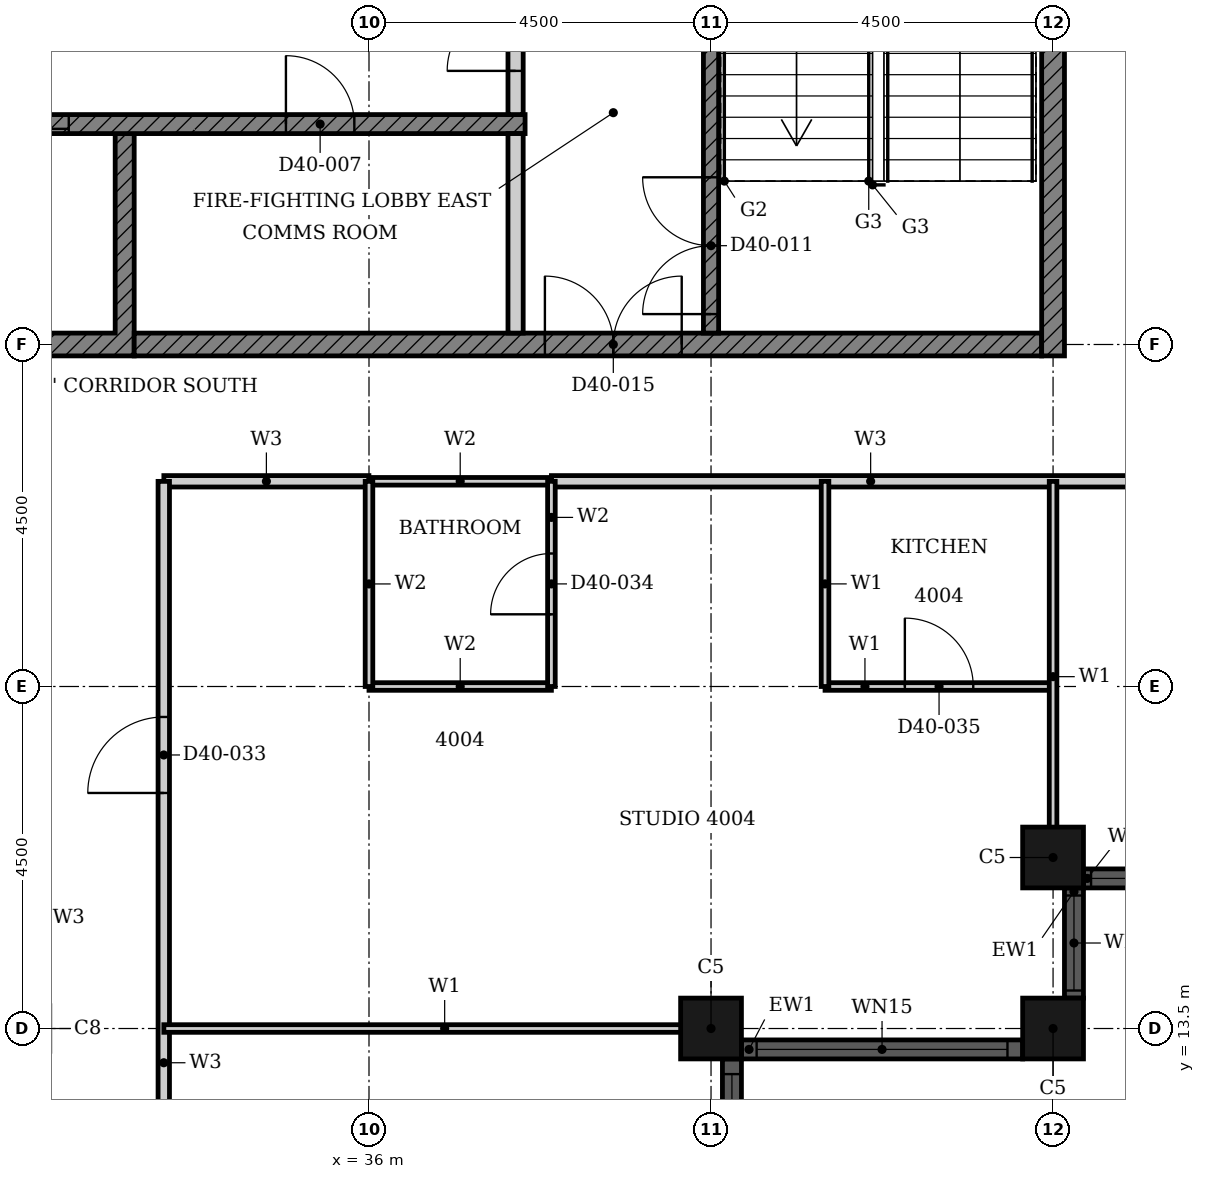
"""IFC4 building model, lengths in metres.
Left out: names, types, materials, properties, quantities, classifications, styles, units other than length and angle.
Written with IfcOpenShell. Run it as: python <this file> out.ifc"""

import sys

from ifc_helpers import new_model, si_unit, direction, frame, frame_2d, origin, origin_2d, place, context, subcontext, project, spatial, polyline, rectangle, hollow_rectangle, outline, extrude, element, fill, save


model = new_model("IFC4")
c1 = context("Model", 3, precision=1e-05, world=origin(), true_north=direction((0.0, 1.0)))
c2 = subcontext(c1, "Body", "Model", "MODEL_VIEW")
j1 = project(units=[si_unit("LENGTHUNIT", "METRE"), si_unit("PLANEANGLEUNIT", "RADIAN")], contexts=[c1])
p1 = place(None, origin())
s1 = spatial("IfcSite", under=j1, at=p1, CompositionType="ELEMENT")
p2 = place(p1, origin())
s2 = spatial("IfcBuilding", under=s1, at=p2, CompositionType="ELEMENT")
p3 = place(p2, frame((0.0, 0.0, 161.7)))
s3 = spatial("IfcBuildingStorey", under=s2, at=p3, CompositionType="ELEMENT", Elevation=161.7)
for number, where, z_axis, x_axis in (
    (1, (40.5, 13.5, 0.0), (0.0, 0.0, 1.0), (1.0, 0.0, 0.0)),
    (2, (45.0, 13.5, 0.0), (0.0, 0.0, 1.0), (1.0, 0.0, 0.0)),
    (3, (45.0, 15.75, 0.0), (0.0, 0.0, 1.0), (1.0, 0.0, 0.0)),
):
    element("IfcColumn", number, at=place(p3, frame(where, z_axis=z_axis, x_axis=x_axis)), inside=s3, PredefinedType="COLUMN", context=c2, shape_type="SweptSolid", body=[
        extrude(hollow_rectangle(XDim=0.8, YDim=0.8, WallThickness=0.025, at=origin_2d()), origin(), (0.0, 0.0, 1.0), 3.7),
    ])
p4 = place(p3, frame((40.775, 4.9, 0.0), z_axis=(0.0, 0.0, 1.0), x_axis=(0.0, 1.0, 0.0)))
e4 = element("IfcWall", 4, at=p4, inside=s3, PredefinedType="SOLIDWALL", context=c2, shape_type="SweptSolid", body=[
    extrude(rectangle(XDim=8.2, YDim=0.25, at=frame_2d((4.1, 0.0))), origin(), (0.0, 0.0, 1.0), 3.7),
])
p5 = place(p4, frame((0.2, 0.0, 0.45)))
e5 = element("IfcOpeningElement", 5, at=p5, cuts=e4, PredefinedType="OPENING", context=c2, shape_type="SweptSolid", body=[
    extrude(rectangle(XDim=3.3, YDim=2.3, at=frame_2d((1.65, 1.15))), frame((0.0, 0.135, 0.0), z_axis=(0.0, -1.0, 0.0), x_axis=(1.0, 0.0, 0.0)), (0.0, 0.0, 1.0), 0.27),
])
p6 = place(p4, frame((4.7, 0.0, 0.45)))
e6 = element("IfcOpeningElement", 6, at=p6, cuts=e4, PredefinedType="OPENING", context=c2, shape_type="SweptSolid", body=[
    extrude(rectangle(XDim=3.3, YDim=2.3, at=frame_2d((1.65, 1.15))), frame((0.0, 0.135, 0.0), z_axis=(0.0, -1.0, 0.0), x_axis=(1.0, 0.0, 0.0)), (0.0, 0.0, 1.0), 0.27),
])
p7 = place(p3, frame((40.9, 13.225, 0.0), z_axis=(0.0, 0.0, 1.0), x_axis=(1.0, 0.0, 0.0)))
e7 = element("IfcWall", 7, at=p7, inside=s3, PredefinedType="SOLIDWALL", context=c2, shape_type="SweptSolid", body=[
    extrude(rectangle(XDim=3.7, YDim=0.25, at=frame_2d((1.85, 0.0))), origin(), (0.0, 0.0, 1.0), 3.7),
])
p8 = place(p7, frame((0.2, 0.0, 0.45)))
e8 = element("IfcOpeningElement", 8, at=p8, cuts=e7, PredefinedType="OPENING", context=c2, shape_type="SweptSolid", body=[
    extrude(rectangle(XDim=3.3, YDim=2.3, at=frame_2d((1.65, 1.15))), frame((0.0, 0.135, 0.0), z_axis=(0.0, -1.0, 0.0), x_axis=(1.0, 0.0, 0.0)), (0.0, 0.0, 1.0), 0.27),
])
p9 = place(p3, frame((45.275, 13.9, 0.0), z_axis=(0.0, 0.0, 1.0), x_axis=(0.0, 1.0, 0.0)))
e9 = element("IfcWall", 9, at=p9, inside=s3, PredefinedType="SOLIDWALL", context=c2, shape_type="SweptSolid", body=[
    extrude(rectangle(XDim=1.45, YDim=0.25, at=frame_2d((0.725, 0.0))), origin(), (0.0, 0.0, 1.0), 3.7),
])
p10 = place(p9, frame((0.1, 0.0, 0.9)))
e10 = element("IfcOpeningElement", 10, at=p10, cuts=e9, PredefinedType="OPENING", context=c2, shape_type="SweptSolid", body=[
    extrude(rectangle(XDim=1.25, YDim=1.85, at=frame_2d((0.625, 0.925))), frame((0.0, 0.135, 0.0), z_axis=(0.0, -1.0, 0.0), x_axis=(1.0, 0.0, 0.0)), (0.0, 0.0, 1.0), 0.27),
])
p11 = place(p3, frame((45.4, 15.475, 0.0), z_axis=(0.0, 0.0, 1.0), x_axis=(1.0, 0.0, 0.0)))
e11 = element("IfcWall", 11, at=p11, inside=s3, PredefinedType="SOLIDWALL", context=c2, shape_type="SweptSolid", body=[
    extrude(rectangle(XDim=1.45, YDim=0.25, at=frame_2d((0.725, 0.0))), origin(), (0.0, 0.0, 1.0), 3.7),
])
p12 = place(p11, frame((0.1, 0.0, 0.9)))
e12 = element("IfcOpeningElement", 12, at=p12, cuts=e11, PredefinedType="OPENING", context=c2, shape_type="SweptSolid", body=[
    extrude(rectangle(XDim=1.25, YDim=1.85, at=frame_2d((0.625, 0.925))), frame((0.0, 0.135, 0.0), z_axis=(0.0, -1.0, 0.0), x_axis=(1.0, 0.0, 0.0)), (0.0, 0.0, 1.0), 0.27),
])
p13 = place(p3, origin())
e13 = element("IfcWall", 13, at=p13, inside=s3, PredefinedType="SHEAR", context=c2, shape_type="SweptSolid", body=[
    extrude(outline(polyline([(27.518, 22.35), (32.911, 22.35), (32.911, 25.275), (32.661, 25.275), (32.661, 22.65), (30.339, 22.65), (30.339, 25.275), (30.089, 25.275), (30.089, 22.65), (27.768, 22.65), (27.768, 25.275), (27.518, 25.275), (27.518, 22.35)])), origin(), (0.0, 0.0, 1.0), 3.4),
])
p14 = place(p3, frame((32.911, 22.5, 0.0), z_axis=(0.0, 0.0, 1.0), x_axis=(1.0, 0.0, 0.0)))
e14 = element("IfcWall", 14, at=p14, inside=s3, PredefinedType="SHEAR", context=c2, shape_type="SweptSolid", body=[
    extrude(rectangle(XDim=11.939, YDim=0.3, at=frame_2d((5.97, 0.0))), origin(), (0.0, 0.0, 1.0), 3.4),
])
p15 = place(p14, frame((5.404, 0.0, 0.0)))
e15 = element("IfcOpeningElement", 15, at=p15, cuts=e14, PredefinedType="OPENING", context=c2, shape_type="SweptSolid", body=[
    extrude(rectangle(XDim=1.8, YDim=2.1, at=frame_2d((0.9, 1.05))), frame((0.0, 0.16, 0.0), z_axis=(0.0, -1.0, 0.0), x_axis=(1.0, 0.0, 0.0)), (0.0, 0.0, 1.0), 0.32),
])
p16 = place(p3, frame((45.0, 22.35, 0.0), z_axis=(0.0, 0.0, 1.0), x_axis=(0.0, 1.0, 0.0)))
e16 = element("IfcWall", 16, at=p16, inside=s3, PredefinedType="SHEAR", context=c2, shape_type="SweptSolid", body=[
    extrude(rectangle(XDim=9.3, YDim=0.3, at=frame_2d((4.65, 0.0))), origin(), (0.0, 0.0, 1.0), 3.4),
])
p17 = place(p3, frame((22.375, 25.4, 0.0), z_axis=(0.0, 0.0, 1.0), x_axis=(1.0, 0.0, 0.0)))
e17 = element("IfcWall", 17, at=p17, inside=s3, PredefinedType="SHEAR", context=c2, shape_type="SweptSolid", body=[
    extrude(rectangle(XDim=15.678, YDim=0.25, at=frame_2d((7.839, 0.0))), origin(), (0.0, 0.0, 1.0), 3.4),
])
p18 = place(p17, frame((8.575, 0.0, 0.0)))
e18 = element("IfcOpeningElement", 18, at=p18, cuts=e17, PredefinedType="OPENING", context=c2, shape_type="SweptSolid", body=[
    extrude(rectangle(XDim=1.1, YDim=2.1, at=frame_2d((0.55, 1.05))), frame((0.0, 0.135, 0.0), z_axis=(0.0, -1.0, 0.0), x_axis=(1.0, 0.0, 0.0)), (0.0, 0.0, 1.0), 0.27),
])
p19 = place(p17, frame((0.861, 0.0, 0.0)))
e19 = element("IfcOpeningElement", 19, at=p19, cuts=e17, PredefinedType="OPENING", context=c2, shape_type="SweptSolid", body=[
    extrude(rectangle(XDim=1.1, YDim=2.1, at=frame_2d((0.55, 1.05))), frame((0.0, 0.135, 0.0), z_axis=(0.0, -1.0, 0.0), x_axis=(1.0, 0.0, 0.0)), (0.0, 0.0, 1.0), 0.27),
])
p20 = place(p17, frame((3.532, 0.0, 0.0)))
e20 = element("IfcOpeningElement", 20, at=p20, cuts=e17, PredefinedType="OPENING", context=c2, shape_type="SweptSolid", body=[
    extrude(rectangle(XDim=0.9, YDim=2.1, at=frame_2d((0.45, 1.05))), frame((0.0, 0.135, 0.0), z_axis=(0.0, -1.0, 0.0), x_axis=(1.0, 0.0, 0.0)), (0.0, 0.0, 1.0), 0.27),
])
p21 = place(p17, frame((12.532, 0.0, 0.0)))
e21 = element("IfcOpeningElement", 21, at=p21, cuts=e17, PredefinedType="OPENING", context=c2, shape_type="SweptSolid", body=[
    extrude(rectangle(XDim=0.9, YDim=2.1, at=frame_2d((0.45, 1.05))), frame((0.0, 0.135, 0.0), z_axis=(0.0, -1.0, 0.0), x_axis=(1.0, 0.0, 0.0)), (0.0, 0.0, 1.0), 0.27),
])
p22 = place(p3, frame((37.928, 22.65, 0.0), z_axis=(0.0, 0.0, 1.0), x_axis=(0.0, 1.0, 0.0)))
e22 = element("IfcWall", 22, at=p22, inside=s3, PredefinedType="PARTITIONING", context=c2, shape_type="SweptSolid", body=[
    extrude(rectangle(XDim=2.625, YDim=0.2, at=frame_2d((1.312, 0.0))), origin(), (0.0, 0.0, 1.0), 3.4),
])
p23 = place(p3, frame((40.5, 22.65, 0.0), z_axis=(0.0, 0.0, 1.0), x_axis=(0.0, 1.0, 0.0)))
e23 = element("IfcWall", 23, at=p23, inside=s3, PredefinedType="SHEAR", context=c2, shape_type="SweptSolid", body=[
    extrude(rectangle(XDim=5.825, YDim=0.2, at=frame_2d((2.913, 0.0))), origin(), (0.0, 0.0, 1.0), 3.4),
])
p24 = place(p23, frame((0.25, 0.0, 0.0)))
e24 = element("IfcOpeningElement", 24, at=p24, cuts=e23, PredefinedType="OPENING", context=c2, shape_type="SweptSolid", body=[
    extrude(rectangle(XDim=1.8, YDim=2.1, at=frame_2d((0.9, 1.05))), frame((0.0, 0.11, 0.0), z_axis=(0.0, -1.0, 0.0), x_axis=(1.0, 0.0, 0.0)), (0.0, 0.0, 1.0), 0.22),
])
p25 = place(p3, frame((37.928, 25.525, 0.0), z_axis=(0.0, 0.0, 1.0), x_axis=(0.0, 1.0, 0.0)))
e25 = element("IfcWall", 25, at=p25, inside=s3, PredefinedType="PARTITIONING", context=c2, shape_type="SweptSolid", body=[
    extrude(rectangle(XDim=2.95, YDim=0.2, at=frame_2d((1.475, 0.0))), origin(), (0.0, 0.0, 1.0), 3.4),
])
p26 = place(p25, frame((0.575, 0.0, 0.0)))
e26 = element("IfcOpeningElement", 26, at=p26, cuts=e25, PredefinedType="OPENING", context=c2, shape_type="SweptSolid", body=[
    extrude(rectangle(XDim=1.8, YDim=2.1, at=frame_2d((0.9, 1.05))), frame((0.0, 0.11, 0.0), z_axis=(0.0, -1.0, 0.0), x_axis=(1.0, 0.0, 0.0)), (0.0, 0.0, 1.0), 0.22),
])
p27 = place(p3, frame((33.301, 20.7, 0.0), z_axis=(0.0, 0.0, 1.0), x_axis=(1.0, 0.0, 0.0)))
e27 = element("IfcWall", 27, at=p27, inside=s3, PredefinedType="PARTITIONING", context=c2, shape_type="SweptSolid", body=[
    extrude(rectangle(XDim=2.698, YDim=0.15, at=frame_2d((1.349, 0.0))), origin(), (0.0, 0.0, 1.0), 3.4),
])
p28 = place(p3, frame((38.4, 20.7, 0.0), z_axis=(0.0, 0.0, 1.0), x_axis=(1.0, 0.0, 0.0)))
e28 = element("IfcWall", 28, at=p28, inside=s3, PredefinedType="PARTITIONING", context=c2, shape_type="SweptSolid", body=[
    extrude(rectangle(XDim=8.4, YDim=0.15, at=frame_2d((4.2, 0.0))), origin(), (0.0, 0.0, 1.0), 3.4),
])
p29 = place(p3, frame((33.3, 4.5, 0.0), z_axis=(0.0, 0.0, 1.0), x_axis=(0.0, 1.0, 0.0)))
e29 = element("IfcWall", 29, at=p29, inside=s3, PredefinedType="PARTITIONING", context=c2, shape_type="SweptSolid", body=[
    extrude(rectangle(XDim=16.199, YDim=0.15, at=frame_2d((8.1, 0.0))), origin(), (0.0, 0.0, 1.0), 3.4),
])
p30 = place(p29, frame((12.099, 0.0, 0.0)))
e30 = element("IfcOpeningElement", 30, at=p30, cuts=e29, PredefinedType="OPENING", context=c2, shape_type="SweptSolid", body=[
    extrude(rectangle(XDim=1.0, YDim=2.2, at=frame_2d((0.5, 1.1))), frame((0.0, 0.085, 0.0), z_axis=(0.0, -1.0, 0.0), x_axis=(1.0, 0.0, 0.0)), (0.0, 0.0, 1.0), 0.17),
])
p31 = place(p29, frame((4.0, 0.0, 0.0)))
e31 = element("IfcOpeningElement", 31, at=p31, cuts=e29, PredefinedType="OPENING", context=c2, shape_type="SweptSolid", body=[
    extrude(rectangle(XDim=1.0, YDim=2.1, at=frame_2d((0.5, 1.05))), frame((0.0, 0.085, 0.0), z_axis=(0.0, -1.0, 0.0), x_axis=(1.0, 0.0, 0.0)), (0.0, 0.0, 1.0), 0.17),
])
p32 = place(p3, frame((33.301, 13.5, 0.0), z_axis=(0.0, 0.0, 1.0), x_axis=(1.0, 0.0, 0.0)))
e32 = element("IfcWall", 32, at=p32, inside=s3, PredefinedType="PARTITIONING", context=c2, shape_type="SweptSolid", body=[
    extrude(rectangle(XDim=7.389, YDim=0.1, at=frame_2d((3.694, 0.0))), origin(), (0.0, 0.0, 1.0), 2.48),
])
p33 = place(p3, frame((42.0, 18.0, 0.0), z_axis=(0.0, 0.0, 1.0), x_axis=(1.0, 0.0, 0.0)))
e33 = element("IfcWall", 33, at=p33, inside=s3, PredefinedType="PARTITIONING", context=c2, shape_type="SweptSolid", body=[
    extrude(rectangle(XDim=3.0, YDim=0.1, at=frame_2d((1.5, 0.0))), origin(), (0.0, 0.0, 1.0), 3.4),
])
p34 = place(p33, frame((1.05, 0.0, 0.0)))
e34 = element("IfcOpeningElement", 34, at=p34, cuts=e33, PredefinedType="OPENING", context=c2, shape_type="SweptSolid", body=[
    extrude(rectangle(XDim=0.9, YDim=2.1, at=frame_2d((0.45, 1.05))), frame((0.0, 0.06, 0.0), z_axis=(0.0, -1.0, 0.0), x_axis=(1.0, 0.0, 0.0)), (0.0, 0.0, 1.0), 0.12),
])
p35 = place(p3, frame((42.0, 18.0, 0.0), z_axis=(0.0, 0.0, 1.0), x_axis=(0.0, 1.0, 0.0)))
e35 = element("IfcWall", 35, at=p35, inside=s3, PredefinedType="PARTITIONING", context=c2, shape_type="SweptSolid", body=[
    extrude(rectangle(XDim=2.7, YDim=0.1, at=frame_2d((1.35, 0.0))), origin(), (0.0, 0.0, 1.0), 3.4),
])
p36 = place(p3, frame((45.0, 15.56, 0.0), z_axis=(0.0, 0.0, 1.0), x_axis=(0.0, 1.0, 0.0)))
e36 = element("IfcWall", 36, at=p36, inside=s3, PredefinedType="PARTITIONING", context=c2, shape_type="SweptSolid", body=[
    extrude(rectangle(XDim=5.139, YDim=0.1, at=frame_2d((2.569, 0.0))), origin(), (0.0, 0.0, 1.0), 3.4),
])
for number, where, z_axis, x_axis in (
    (37, (36.0, 18.0, 0.0), (0.0, 0.0, 1.0), (1.0, 0.0, 0.0)),
    (38, (36.0, 20.7, 0.0), (0.0, 0.0, 1.0), (1.0, 0.0, 0.0)),
):
    element("IfcWall", number, at=place(p3, frame(where, z_axis=z_axis, x_axis=x_axis)), inside=s3, PredefinedType="PARTITIONING", context=c2, shape_type="SweptSolid", body=[
        extrude(rectangle(XDim=2.4, YDim=0.1, at=frame_2d((1.2, 0.0))), origin(), (0.0, 0.0, 1.0), 3.4),
    ])
p37 = place(p3, frame((36.0, 18.0, 0.0), z_axis=(0.0, 0.0, 1.0), x_axis=(0.0, 1.0, 0.0)))
e39 = element("IfcWall", 39, at=p37, inside=s3, PredefinedType="PARTITIONING", context=c2, shape_type="SweptSolid", body=[
    extrude(rectangle(XDim=2.699, YDim=0.1, at=frame_2d((1.35, 0.0))), origin(), (0.0, 0.0, 1.0), 3.4),
])
p38 = place(p3, frame((38.4, 18.0, 0.0), z_axis=(0.0, 0.0, 1.0), x_axis=(0.0, 1.0, 0.0)))
e40 = element("IfcWall", 40, at=p38, inside=s3, PredefinedType="PARTITIONING", context=c2, shape_type="SweptSolid", body=[
    extrude(rectangle(XDim=2.7, YDim=0.1, at=frame_2d((1.35, 0.0))), origin(), (0.0, 0.0, 1.0), 3.4),
])
p39 = place(p38, frame((0.95, 0.0, 0.0)))
e41 = element("IfcOpeningElement", 41, at=p39, cuts=e40, PredefinedType="OPENING", context=c2, shape_type="SweptSolid", body=[
    extrude(rectangle(XDim=0.8, YDim=2.1, at=frame_2d((0.4, 1.05))), frame((0.0, 0.06, 0.0), z_axis=(0.0, -1.0, 0.0), x_axis=(1.0, 0.0, 0.0)), (0.0, 0.0, 1.0), 0.12),
])
p40 = place(p6, origin())
e42 = element("IfcWindow", 42, at=p40, inside=s3, PartitioningType="SINGLE_PANEL", PredefinedType="WINDOW", context=c2, shape_type="SweptSolid", body=[
    extrude(rectangle(XDim=3.3, YDim=2.3, at=frame_2d((1.65, 1.15))), frame((0.0, 0.03, 0.0), z_axis=(0.0, -1.0, 0.0), x_axis=(1.0, 0.0, 0.0)), (0.0, 0.0, 1.0), 0.06),
])
fill(e6, e42)
p41 = place(p8, origin())
e43 = element("IfcWindow", 43, at=p41, inside=s3, PartitioningType="SINGLE_PANEL", PredefinedType="WINDOW", context=c2, shape_type="SweptSolid", body=[
    extrude(rectangle(XDim=3.3, YDim=2.3, at=frame_2d((1.65, 1.15))), frame((0.0, 0.03, 0.0), z_axis=(0.0, -1.0, 0.0), x_axis=(1.0, 0.0, 0.0)), (0.0, 0.0, 1.0), 0.06),
])
fill(e8, e43)
p42 = place(p10, origin())
e44 = element("IfcWindow", 44, at=p42, inside=s3, PartitioningType="SINGLE_PANEL", PredefinedType="WINDOW", context=c2, shape_type="SweptSolid", body=[
    extrude(rectangle(XDim=1.25, YDim=1.85, at=frame_2d((0.625, 0.925))), frame((0.0, 0.03, 0.0), z_axis=(0.0, -1.0, 0.0), x_axis=(1.0, 0.0, 0.0)), (0.0, 0.0, 1.0), 0.06),
])
fill(e10, e44)
p43 = place(p12, origin())
e45 = element("IfcWindow", 45, at=p43, inside=s3, PartitioningType="SINGLE_PANEL", PredefinedType="WINDOW", context=c2, shape_type="SweptSolid", body=[
    extrude(rectangle(XDim=1.25, YDim=1.85, at=frame_2d((0.625, 0.925))), frame((0.0, 0.03, 0.0), z_axis=(0.0, -1.0, 0.0), x_axis=(1.0, 0.0, 0.0)), (0.0, 0.0, 1.0), 0.06),
])
fill(e12, e45)
p44 = place(p18, origin())
e46 = element("IfcDoor", 46, at=p44, inside=s3, OperationType="DOUBLE_DOOR_SLIDING", PredefinedType="DOOR", context=c2, shape_type="SweptSolid", body=[
    extrude(rectangle(XDim=1.1, YDim=2.1, at=frame_2d((0.55, 1.05))), frame((0.0, 0.025, 0.0), z_axis=(0.0, -1.0, 0.0), x_axis=(1.0, 0.0, 0.0)), (0.0, 0.0, 1.0), 0.05),
])
fill(e18, e46)
p45 = place(p21, origin())
e47 = element("IfcDoor", 47, at=p45, inside=s3, OperationType="SINGLE_SWING_LEFT", PredefinedType="DOOR", context=c2, shape_type="SweptSolid", body=[
    extrude(rectangle(XDim=0.9, YDim=2.1, at=frame_2d((0.45, 1.05))), frame((0.0, 0.025, 0.0), z_axis=(0.0, -1.0, 0.0), x_axis=(1.0, 0.0, 0.0)), (0.0, 0.0, 1.0), 0.05),
])
fill(e21, e47)
p46 = place(p24, origin())
e48 = element("IfcDoor", 48, at=p46, inside=s3, OperationType="DOUBLE_DOOR_SINGLE_SWING", PredefinedType="DOOR", context=c2, shape_type="SweptSolid", body=[
    extrude(rectangle(XDim=1.8, YDim=2.1, at=frame_2d((0.9, 1.05))), frame((0.0, 0.025, 0.0), z_axis=(0.0, -1.0, 0.0), x_axis=(1.0, 0.0, 0.0)), (0.0, 0.0, 1.0), 0.05),
])
fill(e24, e48)
p47 = place(p26, origin())
e49 = element("IfcDoor", 49, at=p47, inside=s3, OperationType="DOUBLE_DOOR_SINGLE_SWING", PredefinedType="DOOR", context=c2, shape_type="SweptSolid", body=[
    extrude(rectangle(XDim=1.8, YDim=2.1, at=frame_2d((0.9, 1.05))), frame((0.0, 0.025, 0.0), z_axis=(0.0, -1.0, 0.0), x_axis=(1.0, 0.0, 0.0)), (0.0, 0.0, 1.0), 0.05),
])
fill(e26, e49)
p48 = place(p15, origin())
e50 = element("IfcDoor", 50, at=p48, inside=s3, OperationType="DOUBLE_DOOR_SINGLE_SWING", PredefinedType="DOOR", context=c2, shape_type="SweptSolid", body=[
    extrude(rectangle(XDim=1.8, YDim=2.1, at=frame_2d((0.9, 1.05))), frame((0.0, 0.025, 0.0), z_axis=(0.0, -1.0, 0.0), x_axis=(1.0, 0.0, 0.0)), (0.0, 0.0, 1.0), 0.05),
])
fill(e15, e50)
p49 = place(p30, origin())
e51 = element("IfcDoor", 51, at=p49, inside=s3, OperationType="SINGLE_SWING_LEFT", PredefinedType="DOOR", context=c2, shape_type="SweptSolid", body=[
    extrude(rectangle(XDim=1.0, YDim=2.2, at=frame_2d((0.5, 1.1))), frame((0.0, 0.025, 0.0), z_axis=(0.0, -1.0, 0.0), x_axis=(1.0, 0.0, 0.0)), (0.0, 0.0, 1.0), 0.05),
])
fill(e30, e51)
p50 = place(p39, origin())
e52 = element("IfcDoor", 52, at=p50, inside=s3, OperationType="SINGLE_SWING_RIGHT", PredefinedType="DOOR", context=c2, shape_type="SweptSolid", body=[
    extrude(rectangle(XDim=0.8, YDim=2.1, at=frame_2d((0.4, 1.05))), frame((0.0, 0.025, 0.0), z_axis=(0.0, -1.0, 0.0), x_axis=(1.0, 0.0, 0.0)), (0.0, 0.0, 1.0), 0.05),
])
fill(e41, e52)
p51 = place(p34, origin())
e53 = element("IfcDoor", 53, at=p51, inside=s3, OperationType="SINGLE_SWING_RIGHT", PredefinedType="DOOR", context=c2, shape_type="SweptSolid", body=[
    extrude(rectangle(XDim=0.9, YDim=2.1, at=frame_2d((0.45, 1.05))), frame((0.0, 0.025, 0.0), z_axis=(0.0, -1.0, 0.0), x_axis=(1.0, 0.0, 0.0)), (0.0, 0.0, 1.0), 0.05),
])
fill(e34, e53)
save(model, sys.argv[1])
